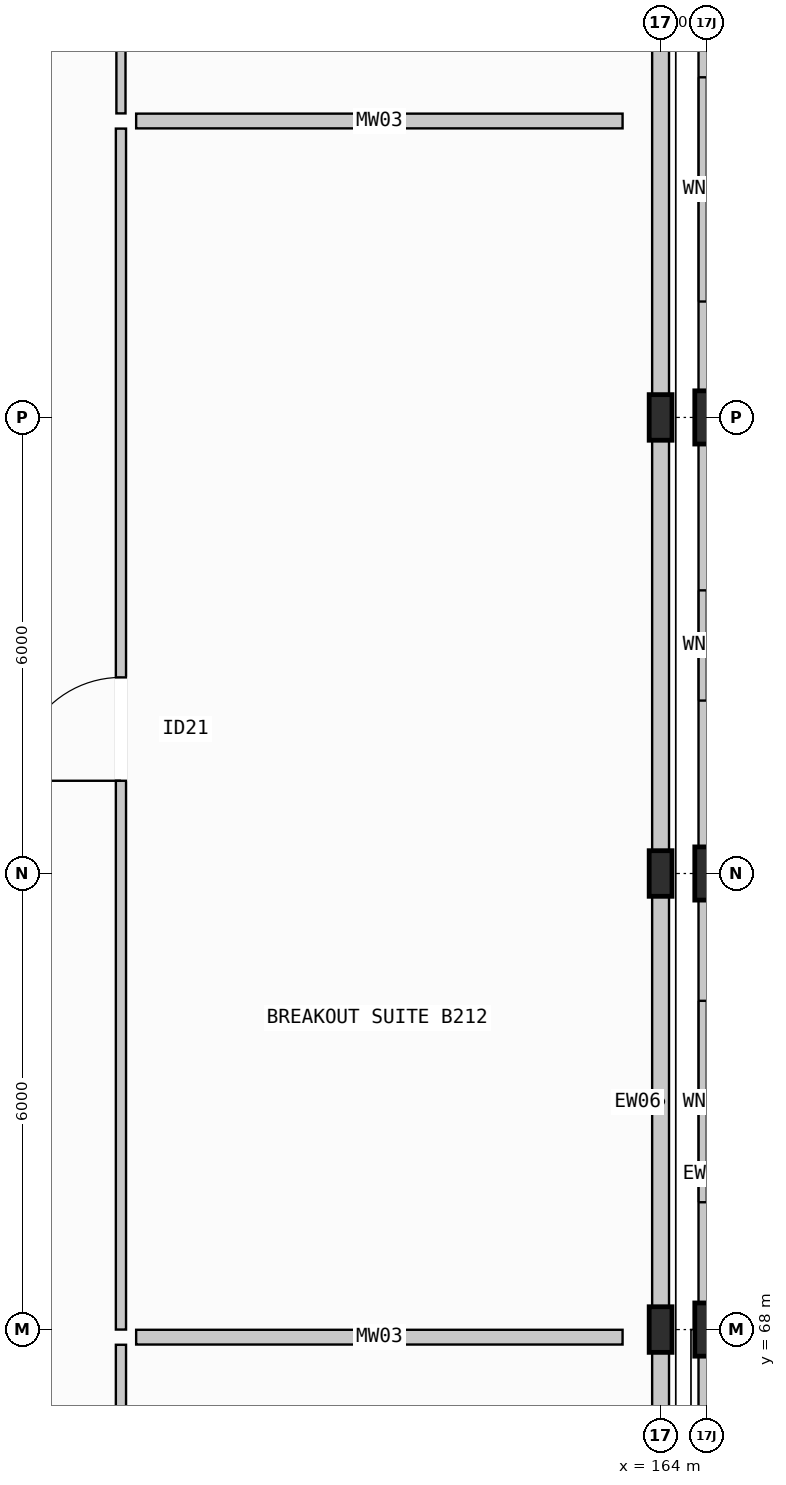
"""IFC4 building model, lengths in metres.
Left out: names, types, materials, properties, quantities, classifications, styles, units other than length and angle.
Written with IfcOpenShell. Run it as: python <this file> out.ifc"""

import sys

from ifc_helpers import new_model, si_unit, direction, frame, frame_2d, origin, origin_2d, place, context, subcontext, project, spatial, rectangle, i_section, extrude, element, fill, save


model = new_model("IFC4")
c1 = context("Model", 3, precision=1e-05, world=origin(), true_north=direction((0.0, 1.0)))
c2 = subcontext(c1, "Body", "Model", "MODEL_VIEW")
j1 = project(units=[si_unit("LENGTHUNIT", "METRE"), si_unit("PLANEANGLEUNIT", "RADIAN")], contexts=[c1])
p1 = place(None, origin())
s1 = spatial("IfcSite", under=j1, at=p1, CompositionType="ELEMENT")
p2 = place(p1, origin())
s2 = spatial("IfcBuilding", under=s1, at=p2, CompositionType="ELEMENT")
p3 = place(p2, frame((0.0, 0.0, 11.4)))
s3 = spatial("IfcBuildingStorey", under=s2, at=p3, CompositionType="ELEMENT", Elevation=11.4)
for number, where, z_axis, x_axis in (
    (1, (164.0, 68.0, 0.0), (0.0, 0.0, 1.0), (1.0, 0.0, 0.0)),
    (2, (164.0, 74.0, 0.0), (0.0, 0.0, 1.0), (1.0, 0.0, 0.0)),
    (3, (164.0, 80.0, 0.0), (0.0, 0.0, 1.0), (1.0, 0.0, 0.0)),
):
    element("IfcColumn", number, at=place(p3, frame(where, z_axis=z_axis, x_axis=x_axis)), inside=s3, PredefinedType="COLUMN", context=c2, shape_type="SweptSolid", body=[
        extrude(i_section(OverallWidth=0.3, OverallDepth=0.6, WebThickness=0.015, FlangeThickness=0.03, FilletRadius=0.027, at=origin_2d()), origin(), (0.0, 0.0, 1.0), 5.4),
    ])
for number, where, z_axis, x_axis in (
    (4, (164.6, 68.0, 0.0), (0.0, 0.0, 1.0), (1.0, 0.0, 0.0)),
    (5, (164.6, 74.0, 0.0), (0.0, 0.0, 1.0), (1.0, 0.0, 0.0)),
    (6, (164.6, 80.0, 0.0), (0.0, 0.0, 1.0), (1.0, 0.0, 0.0)),
):
    element("IfcColumn", number, at=place(p3, frame(where, z_axis=z_axis, x_axis=x_axis)), inside=s3, PredefinedType="COLUMN", context=c2, shape_type="SweptSolid", body=[
        extrude(i_section(OverallWidth=0.3, OverallDepth=0.7, WebThickness=0.017, FlangeThickness=0.032, FilletRadius=0.027, at=origin_2d()), origin(), (0.0, 0.0, 1.0), 5.4),
    ])
p4 = place(p3, frame((164.6, 62.346, 0.0), z_axis=(0.0, 0.0, 1.0), x_axis=(0.0, 1.0, 0.0)))
e7 = element("IfcWall", 7, at=p4, inside=s3, PredefinedType="STANDARD", context=c2, shape_type="SweptSolid", body=[
    extrude(rectangle(XDim=5.308, YDim=0.202, at=frame_2d((2.654, 0.0))), origin(), (0.0, 0.0, 1.0), 4.548),
])
p5 = place(p3, frame((164.6, 68.346, 0.0), z_axis=(0.0, 0.0, 1.0), x_axis=(0.0, 1.0, 0.0)))
e8 = element("IfcWall", 8, at=p5, inside=s3, PredefinedType="STANDARD", context=c2, shape_type="SweptSolid", body=[
    extrude(rectangle(XDim=5.308, YDim=0.202, at=frame_2d((2.654, 0.0))), origin(), (0.0, 0.0, 1.0), 4.548),
])
p6 = place(p5, frame((1.329, 0.0, 1.0)))
e9 = element("IfcOpeningElement", 9, at=p6, cuts=e8, PredefinedType="OPENING", context=c2, shape_type="SweptSolid", body=[
    extrude(rectangle(XDim=2.65, YDim=2.35, at=frame_2d((1.325, 1.175))), frame((0.0, 0.111, 0.0), z_axis=(0.0, -1.0, 0.0), x_axis=(1.0, 0.0, 0.0)), (0.0, 0.0, 1.0), 0.222),
])
p7 = place(p3, frame((164.6, 74.346, 0.0), z_axis=(0.0, 0.0, 1.0), x_axis=(0.0, 1.0, 0.0)))
e10 = element("IfcWall", 10, at=p7, inside=s3, PredefinedType="STANDARD", context=c2, shape_type="SweptSolid", body=[
    extrude(rectangle(XDim=5.308, YDim=0.202, at=frame_2d((2.654, 0.0))), origin(), (0.0, 0.0, 1.0), 4.6),
])
p8 = place(p7, frame((1.929, 0.0, 1.0)))
e11 = element("IfcOpeningElement", 11, at=p8, cuts=e10, PredefinedType="OPENING", context=c2, shape_type="SweptSolid", body=[
    extrude(rectangle(XDim=1.45, YDim=2.2, at=frame_2d((0.725, 1.1))), frame((0.0, 0.111, 0.0), z_axis=(0.0, -1.0, 0.0), x_axis=(1.0, 0.0, 0.0)), (0.0, 0.0, 1.0), 0.222),
])
p9 = place(p3, frame((164.6, 80.346, 0.0), z_axis=(0.0, 0.0, 1.0), x_axis=(0.0, 1.0, 0.0)))
e12 = element("IfcWall", 12, at=p9, inside=s3, PredefinedType="STANDARD", context=c2, shape_type="SweptSolid", body=[
    extrude(rectangle(XDim=5.308, YDim=0.202, at=frame_2d((2.654, 0.0))), origin(), (0.0, 0.0, 1.0), 4.6),
])
p10 = place(p9, frame((1.179, 0.0, 1.0)))
e13 = element("IfcOpeningElement", 13, at=p10, cuts=e12, PredefinedType="OPENING", context=c2, shape_type="SweptSolid", body=[
    extrude(rectangle(XDim=2.95, YDim=1.35, at=frame_2d((1.475, 0.675))), frame((0.0, 0.111, 0.0), z_axis=(0.0, -1.0, 0.0), x_axis=(1.0, 0.0, 0.0)), (0.0, 0.0, 1.0), 0.222),
])
for number, where, z_axis, x_axis in (
    (14, (164.0, 62.296, 0.0), (0.0, 0.0, 1.0), (0.0, 1.0, 0.0)),
    (15, (164.0, 68.296, 0.0), (0.0, 0.0, 1.0), (0.0, 1.0, 0.0)),
    (16, (164.0, 74.296, 0.0), (0.0, 0.0, 1.0), (0.0, 1.0, 0.0)),
    (17, (164.0, 80.296, 0.0), (0.0, 0.0, 1.0), (0.0, 1.0, 0.0)),
):
    element("IfcWall", number, at=place(p3, frame(where, z_axis=z_axis, x_axis=x_axis)), inside=s3, PredefinedType="STANDARD", context=c2, shape_type="SweptSolid", body=[
        extrude(rectangle(XDim=5.408, YDim=0.222, at=frame_2d((2.704, 0.0))), origin(), (0.0, 0.0, 1.0), 4.548),
    ])
p11 = place(p3, frame((156.9, 52.0, 0.0), z_axis=(0.0, 0.0, 1.0), x_axis=(0.0, 1.0, 0.0)))
e18 = element("IfcWall", 18, at=p11, inside=s3, PredefinedType="PARTITIONING", context=c2, shape_type="SweptSolid", body=[
    extrude(rectangle(XDim=15.8, YDim=0.134, at=frame_2d((7.9, 0.0))), origin(), (0.0, 0.0, 1.0), 4.4),
])
p12 = place(p11, frame((7.41, 0.0, 0.0)))
e19 = element("IfcOpeningElement", 19, at=p12, cuts=e18, PredefinedType="OPENING", context=c2, shape_type="SweptSolid", body=[
    extrude(rectangle(XDim=0.98, YDim=2.14, at=frame_2d((0.49, 1.07))), frame((0.0, 0.077, 0.0), z_axis=(0.0, -1.0, 0.0), x_axis=(1.0, 0.0, 0.0)), (0.0, 0.0, 1.0), 0.154),
])
p13 = place(p3, frame((156.9, 68.0, 0.0), z_axis=(0.0, 0.0, 1.0), x_axis=(0.0, 1.0, 0.0)))
e20 = element("IfcWall", 20, at=p13, inside=s3, PredefinedType="PARTITIONING", context=c2, shape_type="SweptSolid", body=[
    extrude(rectangle(XDim=15.8, YDim=0.134, at=frame_2d((7.9, 0.0))), origin(), (0.0, 0.0, 1.0), 4.4),
])
p14 = place(p13, frame((7.22, 0.0, 0.0)))
e21 = element("IfcOpeningElement", 21, at=p14, cuts=e20, PredefinedType="OPENING", context=c2, shape_type="SweptSolid", body=[
    extrude(rectangle(XDim=1.36, YDim=2.3, at=frame_2d((0.68, 1.15))), frame((0.0, 0.077, 0.0), z_axis=(0.0, -1.0, 0.0), x_axis=(1.0, 0.0, 0.0)), (0.0, 0.0, 1.0), 0.154),
])
p15 = place(p3, frame((156.9, 84.0, 0.0), z_axis=(0.0, 0.0, 1.0), x_axis=(0.0, 1.0, 0.0)))
e22 = element("IfcWall", 22, at=p15, inside=s3, PredefinedType="PARTITIONING", context=c2, shape_type="SweptSolid", body=[
    extrude(rectangle(XDim=15.8, YDim=0.12, at=frame_2d((7.9, 0.0))), origin(), (0.0, 0.0, 1.0), 4.4),
])
p16 = place(p15, frame((7.43, 0.0, 0.0)))
e23 = element("IfcOpeningElement", 23, at=p16, cuts=e22, PredefinedType="OPENING", context=c2, shape_type="SweptSolid", body=[
    extrude(rectangle(XDim=0.94, YDim=2.12, at=frame_2d((0.47, 1.06))), frame((0.0, 0.07, 0.0), z_axis=(0.0, -1.0, 0.0), x_axis=(1.0, 0.0, 0.0)), (0.0, 0.0, 1.0), 0.14),
])
for number, where, z_axis, x_axis in (
    (24, (157.1, 67.9, 0.0), (0.0, 0.0, 1.0), (1.0, 0.0, 0.0)),
    (25, (157.1, 83.9, 0.0), (0.0, 0.0, 1.0), (1.0, 0.0, 0.0)),
):
    element("IfcWall", number, at=place(p3, frame(where, z_axis=z_axis, x_axis=x_axis)), inside=s3, PredefinedType="MOVABLE", context=c2, shape_type="SweptSolid", body=[
        extrude(rectangle(XDim=6.4, YDim=0.194, at=frame_2d((3.2, 0.0))), origin(), (0.0, 0.0, 1.0), 4.4),
    ])
p17 = place(p6, origin())
e26 = element("IfcWindow", 26, at=p17, inside=s3, PartitioningType="SINGLE_PANEL", PredefinedType="WINDOW", context=c2, shape_type="SweptSolid", body=[
    extrude(rectangle(XDim=2.65, YDim=2.35, at=frame_2d((1.325, 1.175))), frame((0.0, 0.03, 0.0), z_axis=(0.0, -1.0, 0.0), x_axis=(1.0, 0.0, 0.0)), (0.0, 0.0, 1.0), 0.06),
])
fill(e9, e26)
p18 = place(p8, origin())
e27 = element("IfcWindow", 27, at=p18, inside=s3, PartitioningType="SINGLE_PANEL", PredefinedType="WINDOW", context=c2, shape_type="SweptSolid", body=[
    extrude(rectangle(XDim=1.45, YDim=2.2, at=frame_2d((0.725, 1.1))), frame((0.0, 0.03, 0.0), z_axis=(0.0, -1.0, 0.0), x_axis=(1.0, 0.0, 0.0)), (0.0, 0.0, 1.0), 0.06),
])
fill(e11, e27)
p19 = place(p10, origin())
e28 = element("IfcWindow", 28, at=p19, inside=s3, PartitioningType="SINGLE_PANEL", PredefinedType="WINDOW", context=c2, shape_type="SweptSolid", body=[
    extrude(rectangle(XDim=2.95, YDim=1.35, at=frame_2d((1.475, 0.675))), frame((0.0, 0.03, 0.0), z_axis=(0.0, -1.0, 0.0), x_axis=(1.0, 0.0, 0.0)), (0.0, 0.0, 1.0), 0.06),
])
fill(e13, e28)
p20 = place(p14, origin())
e29 = element("IfcDoor", 29, at=p20, inside=s3, OperationType="SINGLE_SWING_LEFT", PredefinedType="DOOR", context=c2, shape_type="SweptSolid", body=[
    extrude(rectangle(XDim=1.36, YDim=2.3, at=frame_2d((0.68, 1.15))), frame((0.0, 0.025, 0.0), z_axis=(0.0, -1.0, 0.0), x_axis=(1.0, 0.0, 0.0)), (0.0, 0.0, 1.0), 0.05),
])
fill(e21, e29)
save(model, sys.argv[1])
